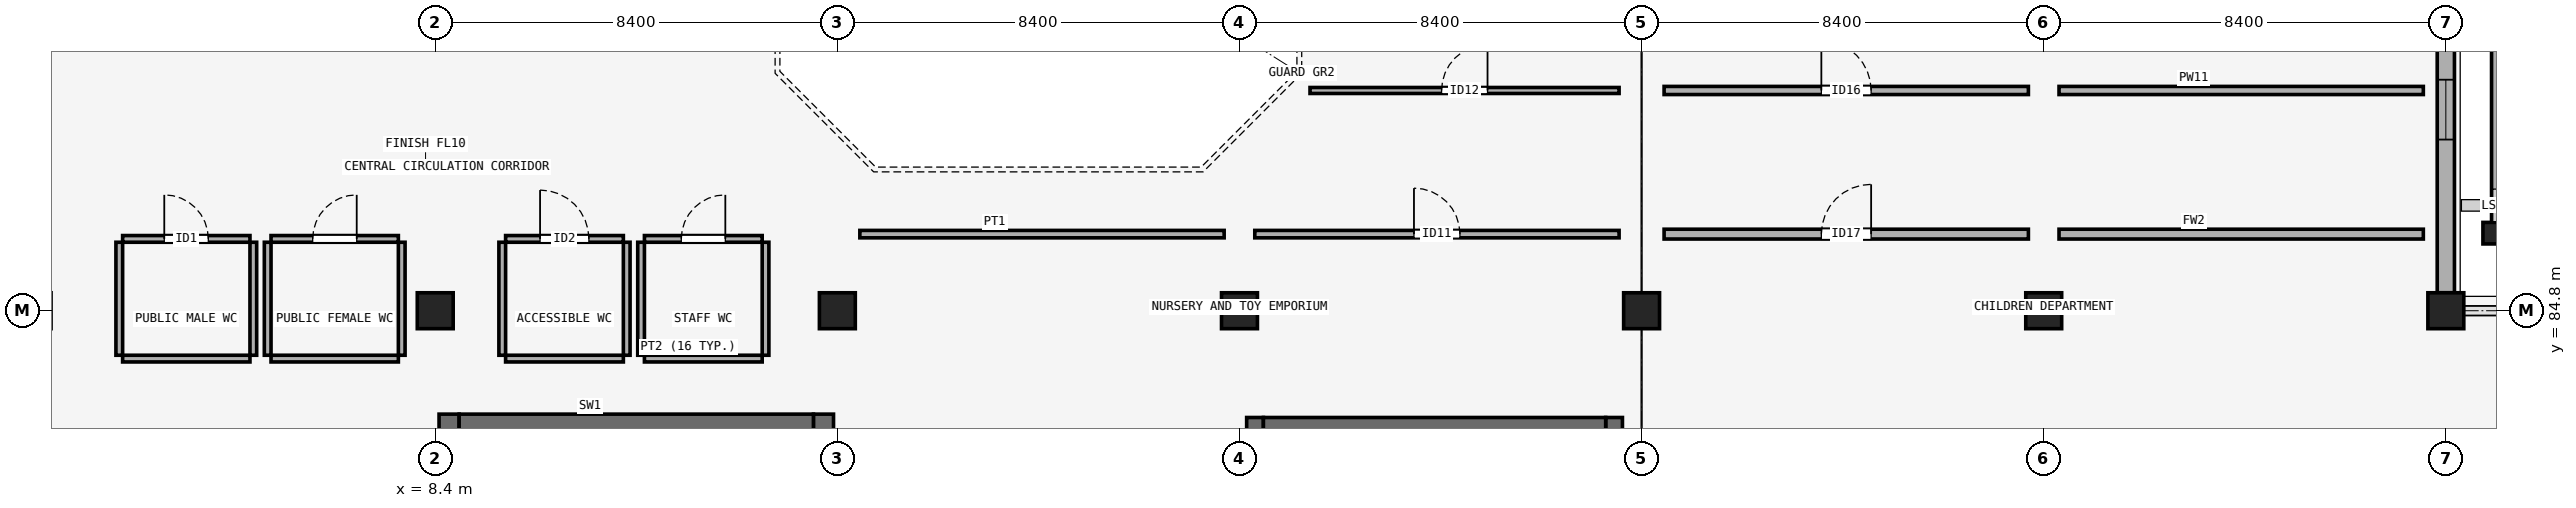
"""IFC4 building model, lengths in metres.
Left out: names, types, materials, properties, quantities, classifications, styles, units other than length and angle.
Written with IfcOpenShell. Run it as: python <this file> out.ifc"""

import sys

from ifc_helpers import new_model, si_unit, direction, frame, frame_2d, origin, origin_2d, place, context, subcontext, project, spatial, rectangle, extrude, element, fill, save


model = new_model("IFC4")
c1 = context("Model", 3, precision=1e-05, world=origin(), true_north=direction((0.0, 1.0)))
c2 = subcontext(c1, "Body", "Model", "MODEL_VIEW")
j1 = project(units=[si_unit("LENGTHUNIT", "METRE"), si_unit("PLANEANGLEUNIT", "RADIAN")], contexts=[c1])
p1 = place(None, origin())
s1 = spatial("IfcSite", under=j1, at=p1, CompositionType="ELEMENT")
p2 = place(p1, origin())
s2 = spatial("IfcBuilding", under=s1, at=p2, CompositionType="ELEMENT")
p3 = place(p2, frame((0.0, 0.0, 14.4)))
s3 = spatial("IfcBuildingStorey", under=s2, at=p3, CompositionType="ELEMENT", Elevation=14.4)
for number, where, z_axis, x_axis in (
    (1, (8.4, 84.8, 0.0), (0.0, 0.0, 1.0), (1.0, 0.0, 0.0)),
    (2, (16.8, 84.8, 0.0), (0.0, 0.0, 1.0), (1.0, 0.0, 0.0)),
    (3, (25.2, 84.8, 0.0), (0.0, 0.0, 1.0), (1.0, 0.0, 0.0)),
    (4, (33.6, 84.8, 0.0), (0.0, 0.0, 1.0), (1.0, 0.0, 0.0)),
    (5, (42.0, 84.8, 0.0), (0.0, 0.0, 1.0), (1.0, 0.0, 0.0)),
    (6, (50.4, 84.8, 0.0), (0.0, 0.0, 1.0), (1.0, 0.0, 0.0)),
):
    element("IfcColumn", number, at=place(p3, frame(where, z_axis=z_axis, x_axis=x_axis)), inside=s3, PredefinedType="COLUMN", context=c2, shape_type="SweptSolid", body=[
        extrude(rectangle(XDim=0.75, YDim=0.75, at=origin_2d()), origin(), (0.0, 0.0, 1.0), 4.5),
    ])
p4 = place(p3, frame((51.45, 86.42, 0.0), z_axis=(0.0, 0.0, 1.0), x_axis=(0.0, 1.0, 0.0)))
e7 = element("IfcColumn", 7, at=p4, inside=s3, PredefinedType="PILASTER", context=c2, shape_type="SweptSolid", body=[
    extrude(rectangle(XDim=0.45, YDim=0.55, at=origin_2d()), origin(), (0.0, 0.0, 1.0), 4.5),
])
p5 = place(p3, frame((50.4, 85.175, 0.0), z_axis=(0.0, 0.0, 1.0), x_axis=(0.0, 1.0, 0.0)))
e8 = element("IfcWall", 8, at=p5, inside=s3, PredefinedType="SOLIDWALL", context=c2, shape_type="SweptSolid", body=[
    extrude(rectangle(XDim=7.65, YDim=0.36, at=frame_2d((3.825, 0.0))), origin(), (0.0, 0.0, 1.0), 3.45),
])
p6 = place(p5, frame((3.2, 0.0, 0.95)))
e9 = element("IfcOpeningElement", 9, at=p6, cuts=e8, PredefinedType="OPENING", context=c2, shape_type="SweptSolid", body=[
    extrude(rectangle(XDim=1.25, YDim=1.85, at=frame_2d((0.625, 0.925))), frame((0.0, 0.19, 0.0), z_axis=(0.0, -1.0, 0.0), x_axis=(1.0, 0.0, 0.0)), (0.0, 0.0, 1.0), 0.38),
])
p7 = place(p3, frame((51.45, 86.67, 3.88), z_axis=(0.0, 0.0, 1.0), x_axis=(0.0, 1.0, 0.0)))
e10 = element("IfcWall", 10, at=p7, inside=s3, PredefinedType="PARAPET", context=c2, shape_type="SweptSolid", body=[
    extrude(rectangle(XDim=4.66, YDim=0.19, at=frame_2d((2.33, 0.0))), origin(), (0.0, 0.0, 1.0), 0.12),
])
p8 = place(p3, frame((8.69, 82.64, 0.0), z_axis=(0.0, 0.0, 1.0), x_axis=(0.0, -1.0, 0.0)))
e11 = element("IfcWall", 11, at=p8, inside=s3, PredefinedType="SHEAR", context=c2, shape_type="SweptSolid", body=[
    extrude(rectangle(XDim=4.08, YDim=0.42, at=frame_2d((2.04, 0.0))), origin(), (0.0, 0.0, 1.0), 4.2),
])
p9 = place(p8, frame((1.315, 0.0, 0.0)))
e12 = element("IfcOpeningElement", 12, at=p9, cuts=e11, PredefinedType="OPENING", context=c2, shape_type="SweptSolid", body=[
    extrude(rectangle(XDim=1.45, YDim=2.2, at=frame_2d((0.725, 1.1))), frame((0.0, 0.22, 0.0), z_axis=(0.0, -1.0, 0.0), x_axis=(1.0, 0.0, 0.0)), (0.0, 0.0, 1.0), 0.44),
])
p10 = place(p3, frame((16.51, 78.56, 0.0), z_axis=(0.0, 0.0, 1.0), x_axis=(0.0, 1.0, 0.0)))
e13 = element("IfcWall", 13, at=p10, inside=s3, PredefinedType="SHEAR", context=c2, shape_type="SweptSolid", body=[
    extrude(rectangle(XDim=4.08, YDim=0.42, at=frame_2d((2.04, 0.0))), origin(), (0.0, 0.0, 1.0), 4.2),
])
p11 = place(p3, frame((8.9, 82.43, 0.0), z_axis=(0.0, 0.0, 1.0), x_axis=(1.0, 0.0, 0.0)))
e14 = element("IfcWall", 14, at=p11, inside=s3, PredefinedType="SHEAR", context=c2, shape_type="SweptSolid", body=[
    extrude(rectangle(XDim=7.4, YDim=0.42, at=frame_2d((3.7, 0.0))), origin(), (0.0, 0.0, 1.0), 4.2),
])
p12 = place(p3, frame((25.525, 82.57, 0.0), z_axis=(0.0, 0.0, 1.0), x_axis=(0.0, -1.0, 0.0)))
e15 = element("IfcWall", 15, at=p12, inside=s3, PredefinedType="SHEAR", context=c2, shape_type="SweptSolid", body=[
    extrude(rectangle(XDim=3.94, YDim=0.35, at=frame_2d((1.97, 0.0))), origin(), (0.0, 0.0, 1.0), 4.2),
])
p13 = place(p12, frame((1.245, 0.0, 0.0)))
e16 = element("IfcOpeningElement", 16, at=p13, cuts=e15, PredefinedType="OPENING", context=c2, shape_type="SweptSolid", body=[
    extrude(rectangle(XDim=1.45, YDim=2.2, at=frame_2d((0.725, 1.1))), frame((0.0, 0.185, 0.0), z_axis=(0.0, -1.0, 0.0), x_axis=(1.0, 0.0, 0.0)), (0.0, 0.0, 1.0), 0.37),
])
p14 = place(p3, frame((33.025, 78.63, 0.0), z_axis=(0.0, 0.0, 1.0), x_axis=(0.0, 1.0, 0.0)))
e17 = element("IfcWall", 17, at=p14, inside=s3, PredefinedType="SHEAR", context=c2, shape_type="SweptSolid", body=[
    extrude(rectangle(XDim=3.94, YDim=0.35, at=frame_2d((1.97, 0.0))), origin(), (0.0, 0.0, 1.0), 4.2),
])
p15 = place(p3, frame((25.7, 82.395, 0.0), z_axis=(0.0, 0.0, 1.0), x_axis=(1.0, 0.0, 0.0)))
e18 = element("IfcWall", 18, at=p15, inside=s3, PredefinedType="SHEAR", context=c2, shape_type="SweptSolid", body=[
    extrude(rectangle(XDim=7.15, YDim=0.35, at=frame_2d((3.575, 0.0))), origin(), (0.0, 0.0, 1.0), 4.2),
])
p16 = place(p3, frame((1.87, 86.3, 0.0), z_axis=(0.0, 0.0, 1.0), x_axis=(1.0, 0.0, 0.0)))
e19 = element("IfcWall", 19, at=p16, inside=s3, PredefinedType="PARTITIONING", context=c2, shape_type="SweptSolid", body=[
    extrude(rectangle(XDim=2.66, YDim=0.14, at=frame_2d((1.33, 0.0))), origin(), (0.0, 0.0, 1.0), 4.2),
])
p17 = place(p16, frame((0.87, 0.0, 0.0)))
e20 = element("IfcOpeningElement", 20, at=p17, cuts=e19, PredefinedType="OPENING", context=c2, shape_type="SweptSolid", body=[
    extrude(rectangle(XDim=0.92, YDim=2.12, at=frame_2d((0.46, 1.06))), frame((0.0, 0.08, 0.0), z_axis=(0.0, -1.0, 0.0), x_axis=(1.0, 0.0, 0.0)), (0.0, 0.0, 1.0), 0.16),
])
p18 = place(p3, frame((1.87, 83.8, 0.0), z_axis=(0.0, 0.0, 1.0), x_axis=(1.0, 0.0, 0.0)))
e21 = element("IfcWall", 21, at=p18, inside=s3, PredefinedType="PARTITIONING", context=c2, shape_type="SweptSolid", body=[
    extrude(rectangle(XDim=2.66, YDim=0.14, at=frame_2d((1.33, 0.0))), origin(), (0.0, 0.0, 1.0), 4.2),
])
for number, where, z_axis, x_axis in (
    (22, (1.8, 83.87, 0.0), (0.0, 0.0, 1.0), (0.0, 1.0, 0.0)),
    (23, (4.6, 83.87, 0.0), (0.0, 0.0, 1.0), (0.0, 1.0, 0.0)),
):
    element("IfcWall", number, at=place(p3, frame(where, z_axis=z_axis, x_axis=x_axis)), inside=s3, PredefinedType="PARTITIONING", context=c2, shape_type="SweptSolid", body=[
        extrude(rectangle(XDim=2.36, YDim=0.14, at=frame_2d((1.18, 0.0))), origin(), (0.0, 0.0, 1.0), 3.45),
    ])
p19 = place(p3, frame((4.97, 86.3, 0.0), z_axis=(0.0, 0.0, 1.0), x_axis=(1.0, 0.0, 0.0)))
e24 = element("IfcWall", 24, at=p19, inside=s3, PredefinedType="PARTITIONING", context=c2, shape_type="SweptSolid", body=[
    extrude(rectangle(XDim=2.66, YDim=0.14, at=frame_2d((1.33, 0.0))), origin(), (0.0, 0.0, 1.0), 4.2),
])
p20 = place(p19, frame((0.87, 0.0, 0.0)))
e25 = element("IfcOpeningElement", 25, at=p20, cuts=e24, PredefinedType="OPENING", context=c2, shape_type="SweptSolid", body=[
    extrude(rectangle(XDim=0.92, YDim=2.12, at=frame_2d((0.46, 1.06))), frame((0.0, 0.08, 0.0), z_axis=(0.0, -1.0, 0.0), x_axis=(1.0, 0.0, 0.0)), (0.0, 0.0, 1.0), 0.16),
])
p21 = place(p3, frame((4.97, 83.8, 0.0), z_axis=(0.0, 0.0, 1.0), x_axis=(1.0, 0.0, 0.0)))
e26 = element("IfcWall", 26, at=p21, inside=s3, PredefinedType="PARTITIONING", context=c2, shape_type="SweptSolid", body=[
    extrude(rectangle(XDim=2.66, YDim=0.14, at=frame_2d((1.33, 0.0))), origin(), (0.0, 0.0, 1.0), 4.2),
])
for number, where, z_axis, x_axis in (
    (27, (4.9, 83.87, 0.0), (0.0, 0.0, 1.0), (0.0, 1.0, 0.0)),
    (28, (7.7, 83.87, 0.0), (0.0, 0.0, 1.0), (0.0, 1.0, 0.0)),
):
    element("IfcWall", number, at=place(p3, frame(where, z_axis=z_axis, x_axis=x_axis)), inside=s3, PredefinedType="PARTITIONING", context=c2, shape_type="SweptSolid", body=[
        extrude(rectangle(XDim=2.36, YDim=0.14, at=frame_2d((1.18, 0.0))), origin(), (0.0, 0.0, 1.0), 3.45),
    ])
p22 = place(p3, frame((9.87, 86.3, 0.0), z_axis=(0.0, 0.0, 1.0), x_axis=(1.0, 0.0, 0.0)))
e29 = element("IfcWall", 29, at=p22, inside=s3, PredefinedType="PARTITIONING", context=c2, shape_type="SweptSolid", body=[
    extrude(rectangle(XDim=2.46, YDim=0.14, at=frame_2d((1.23, 0.0))), origin(), (0.0, 0.0, 1.0), 4.2),
])
p23 = place(p22, frame((0.72, 0.0, 0.0)))
e30 = element("IfcOpeningElement", 30, at=p23, cuts=e29, PredefinedType="OPENING", context=c2, shape_type="SweptSolid", body=[
    extrude(rectangle(XDim=1.02, YDim=2.15, at=frame_2d((0.51, 1.075))), frame((0.0, 0.08, 0.0), z_axis=(0.0, -1.0, 0.0), x_axis=(1.0, 0.0, 0.0)), (0.0, 0.0, 1.0), 0.16),
])
p24 = place(p3, frame((9.87, 83.8, 0.0), z_axis=(0.0, 0.0, 1.0), x_axis=(1.0, 0.0, 0.0)))
e31 = element("IfcWall", 31, at=p24, inside=s3, PredefinedType="PARTITIONING", context=c2, shape_type="SweptSolid", body=[
    extrude(rectangle(XDim=2.46, YDim=0.14, at=frame_2d((1.23, 0.0))), origin(), (0.0, 0.0, 1.0), 4.2),
])
for number, where, z_axis, x_axis in (
    (32, (9.8, 83.87, 0.0), (0.0, 0.0, 1.0), (0.0, 1.0, 0.0)),
    (33, (12.4, 83.87, 0.0), (0.0, 0.0, 1.0), (0.0, 1.0, 0.0)),
):
    element("IfcWall", number, at=place(p3, frame(where, z_axis=z_axis, x_axis=x_axis)), inside=s3, PredefinedType="PARTITIONING", context=c2, shape_type="SweptSolid", body=[
        extrude(rectangle(XDim=2.36, YDim=0.14, at=frame_2d((1.18, 0.0))), origin(), (0.0, 0.0, 1.0), 3.45),
    ])
p25 = place(p3, frame((12.77, 86.3, 0.0), z_axis=(0.0, 0.0, 1.0), x_axis=(1.0, 0.0, 0.0)))
e34 = element("IfcWall", 34, at=p25, inside=s3, PredefinedType="PARTITIONING", context=c2, shape_type="SweptSolid", body=[
    extrude(rectangle(XDim=2.46, YDim=0.14, at=frame_2d((1.23, 0.0))), origin(), (0.0, 0.0, 1.0), 4.2),
])
p26 = place(p25, frame((0.77, 0.0, 0.0)))
e35 = element("IfcOpeningElement", 35, at=p26, cuts=e34, PredefinedType="OPENING", context=c2, shape_type="SweptSolid", body=[
    extrude(rectangle(XDim=0.92, YDim=2.12, at=frame_2d((0.46, 1.06))), frame((0.0, 0.08, 0.0), z_axis=(0.0, -1.0, 0.0), x_axis=(1.0, 0.0, 0.0)), (0.0, 0.0, 1.0), 0.16),
])
p27 = place(p3, frame((12.77, 83.8, 0.0), z_axis=(0.0, 0.0, 1.0), x_axis=(1.0, 0.0, 0.0)))
e36 = element("IfcWall", 36, at=p27, inside=s3, PredefinedType="PARTITIONING", context=c2, shape_type="SweptSolid", body=[
    extrude(rectangle(XDim=2.46, YDim=0.14, at=frame_2d((1.23, 0.0))), origin(), (0.0, 0.0, 1.0), 4.2),
])
for number, where, z_axis, x_axis in (
    (37, (12.7, 83.87, 0.0), (0.0, 0.0, 1.0), (0.0, 1.0, 0.0)),
    (38, (15.3, 83.87, 0.0), (0.0, 0.0, 1.0), (0.0, 1.0, 0.0)),
):
    element("IfcWall", number, at=place(p3, frame(where, z_axis=z_axis, x_axis=x_axis)), inside=s3, PredefinedType="PARTITIONING", context=c2, shape_type="SweptSolid", body=[
        extrude(rectangle(XDim=2.36, YDim=0.14, at=frame_2d((1.18, 0.0))), origin(), (0.0, 0.0, 1.0), 3.45),
    ])
p28 = place(p3, frame((17.27, 86.4, 0.0), z_axis=(0.0, 0.0, 1.0), x_axis=(1.0, 0.0, 0.0)))
e39 = element("IfcWall", 39, at=p28, inside=s3, PredefinedType="PARTITIONING", context=c2, shape_type="SweptSolid", body=[
    extrude(rectangle(XDim=7.61, YDim=0.155, at=frame_2d((3.805, 0.0))), origin(), (0.0, 0.0, 1.0), 4.2),
])
p29 = place(p3, frame((25.52, 86.4, 0.0), z_axis=(0.0, 0.0, 1.0), x_axis=(1.0, 0.0, 0.0)))
e40 = element("IfcWall", 40, at=p29, inside=s3, PredefinedType="PARTITIONING", context=c2, shape_type="SweptSolid", body=[
    extrude(rectangle(XDim=7.61, YDim=0.155, at=frame_2d((3.805, 0.0))), origin(), (0.0, 0.0, 1.0), 4.2),
])
p30 = place(p29, frame((3.325, 0.0, 0.0)))
e41 = element("IfcOpeningElement", 41, at=p30, cuts=e40, PredefinedType="OPENING", context=c2, shape_type="SweptSolid", body=[
    extrude(rectangle(XDim=0.96, YDim=2.1, at=frame_2d((0.48, 1.05))), frame((0.0, 0.087, 0.0), z_axis=(0.0, -1.0, 0.0), x_axis=(1.0, 0.0, 0.0)), (0.0, 0.0, 1.0), 0.175),
])
p31 = place(p3, frame((26.674, 89.4, 0.0), z_axis=(0.0, 0.0, 1.0), x_axis=(1.0, 0.0, 0.0)))
e42 = element("IfcWall", 42, at=p31, inside=s3, PredefinedType="PARTITIONING", context=c2, shape_type="SweptSolid", body=[
    extrude(rectangle(XDim=6.456, YDim=0.125, at=frame_2d((3.228, 0.0))), origin(), (0.0, 0.0, 1.0), 4.2),
])
p32 = place(p31, frame((2.748, 0.0, 0.0)))
e43 = element("IfcOpeningElement", 43, at=p32, cuts=e42, PredefinedType="OPENING", context=c2, shape_type="SweptSolid", body=[
    extrude(rectangle(XDim=0.96, YDim=2.22, at=frame_2d((0.48, 1.11))), frame((0.0, 0.073, 0.0), z_axis=(0.0, -1.0, 0.0), x_axis=(1.0, 0.0, 0.0)), (0.0, 0.0, 1.0), 0.145),
])
p33 = place(p3, frame((34.07, 89.4, 0.0), z_axis=(0.0, 0.0, 1.0), x_axis=(1.0, 0.0, 0.0)))
e44 = element("IfcWall", 44, at=p33, inside=s3, PredefinedType="PARTITIONING", context=c2, shape_type="SweptSolid", body=[
    extrude(rectangle(XDim=7.61, YDim=0.17, at=frame_2d((3.805, 0.0))), origin(), (0.0, 0.0, 1.0), 3.45),
])
p34 = place(p33, frame((3.285, 0.0, 0.0)))
e45 = element("IfcOpeningElement", 45, at=p34, cuts=e44, PredefinedType="OPENING", context=c2, shape_type="SweptSolid", body=[
    extrude(rectangle(XDim=1.04, YDim=2.22, at=frame_2d((0.52, 1.11))), frame((0.0, 0.095, 0.0), z_axis=(0.0, -1.0, 0.0), x_axis=(1.0, 0.0, 0.0)), (0.0, 0.0, 1.0), 0.19),
])
p35 = place(p3, frame((42.32, 89.4, 0.0), z_axis=(0.0, 0.0, 1.0), x_axis=(1.0, 0.0, 0.0)))
e46 = element("IfcWall", 46, at=p35, inside=s3, PredefinedType="PARTITIONING", context=c2, shape_type="SweptSolid", body=[
    extrude(rectangle(XDim=7.61, YDim=0.17, at=frame_2d((3.805, 0.0))), origin(), (0.0, 0.0, 1.0), 3.45),
])
p36 = place(p3, frame((34.07, 86.4, 0.0), z_axis=(0.0, 0.0, 1.0), x_axis=(1.0, 0.0, 0.0)))
e47 = element("IfcWall", 47, at=p36, inside=s3, PredefinedType="PARTITIONING", context=c2, shape_type="SweptSolid", body=[
    extrude(rectangle(XDim=7.61, YDim=0.205, at=frame_2d((3.805, 0.0))), origin(), (0.0, 0.0, 1.0), 3.45),
])
p37 = place(p36, frame((3.285, 0.0, 0.0)))
e48 = element("IfcOpeningElement", 48, at=p37, cuts=e47, PredefinedType="OPENING", context=c2, shape_type="SweptSolid", body=[
    extrude(rectangle(XDim=1.04, YDim=2.34, at=frame_2d((0.52, 1.17))), frame((0.0, 0.113, 0.0), z_axis=(0.0, -1.0, 0.0), x_axis=(1.0, 0.0, 0.0)), (0.0, 0.0, 1.0), 0.225),
])
p38 = place(p3, frame((42.32, 86.4, 0.0), z_axis=(0.0, 0.0, 1.0), x_axis=(1.0, 0.0, 0.0)))
e49 = element("IfcWall", 49, at=p38, inside=s3, PredefinedType="PARTITIONING", context=c2, shape_type="SweptSolid", body=[
    extrude(rectangle(XDim=7.61, YDim=0.205, at=frame_2d((3.805, 0.0))), origin(), (0.0, 0.0, 1.0), 3.45),
])
p39 = place(p6, origin())
e50 = element("IfcWindow", 50, at=p39, inside=s3, PartitioningType="SINGLE_PANEL", PredefinedType="WINDOW", context=c2, shape_type="SweptSolid", body=[
    extrude(rectangle(XDim=1.25, YDim=1.85, at=frame_2d((0.625, 0.925))), frame((0.0, 0.03, 0.0), z_axis=(0.0, -1.0, 0.0), x_axis=(1.0, 0.0, 0.0)), (0.0, 0.0, 1.0), 0.06),
])
fill(e9, e50)
p40 = place(p17, origin())
e51 = element("IfcDoor", 51, at=p40, inside=s3, OperationType="SINGLE_SWING_LEFT", PredefinedType="DOOR", context=c2, shape_type="SweptSolid", body=[
    extrude(rectangle(XDim=0.92, YDim=2.12, at=frame_2d((0.46, 1.06))), frame((0.0, 0.025, 0.0), z_axis=(0.0, -1.0, 0.0), x_axis=(1.0, 0.0, 0.0)), (0.0, 0.0, 1.0), 0.05),
])
fill(e20, e51)
p41 = place(p20, origin())
e52 = element("IfcDoor", 52, at=p41, inside=s3, OperationType="SINGLE_SWING_RIGHT", PredefinedType="DOOR", context=c2, shape_type="SweptSolid", body=[
    extrude(rectangle(XDim=0.92, YDim=2.12, at=frame_2d((0.46, 1.06))), frame((0.0, 0.025, 0.0), z_axis=(0.0, -1.0, 0.0), x_axis=(1.0, 0.0, 0.0)), (0.0, 0.0, 1.0), 0.05),
])
fill(e25, e52)
p42 = place(p23, origin())
e53 = element("IfcDoor", 53, at=p42, inside=s3, OperationType="SINGLE_SWING_LEFT", PredefinedType="DOOR", context=c2, shape_type="SweptSolid", body=[
    extrude(rectangle(XDim=1.02, YDim=2.15, at=frame_2d((0.51, 1.075))), frame((0.0, 0.025, 0.0), z_axis=(0.0, -1.0, 0.0), x_axis=(1.0, 0.0, 0.0)), (0.0, 0.0, 1.0), 0.05),
])
fill(e30, e53)
p43 = place(p26, origin())
e54 = element("IfcDoor", 54, at=p43, inside=s3, OperationType="SINGLE_SWING_RIGHT", PredefinedType="DOOR", context=c2, shape_type="SweptSolid", body=[
    extrude(rectangle(XDim=0.92, YDim=2.12, at=frame_2d((0.46, 1.06))), frame((0.0, 0.025, 0.0), z_axis=(0.0, -1.0, 0.0), x_axis=(1.0, 0.0, 0.0)), (0.0, 0.0, 1.0), 0.05),
])
fill(e35, e54)
p44 = place(p30, origin())
e55 = element("IfcDoor", 55, at=p44, inside=s3, OperationType="SINGLE_SWING_LEFT", PredefinedType="DOOR", context=c2, shape_type="SweptSolid", body=[
    extrude(rectangle(XDim=0.96, YDim=2.1, at=frame_2d((0.48, 1.05))), frame((0.0, 0.025, 0.0), z_axis=(0.0, -1.0, 0.0), x_axis=(1.0, 0.0, 0.0)), (0.0, 0.0, 1.0), 0.05),
])
fill(e41, e55)
p45 = place(p32, origin())
e56 = element("IfcDoor", 56, at=p45, inside=s3, OperationType="SINGLE_SWING_RIGHT", PredefinedType="DOOR", context=c2, shape_type="SweptSolid", body=[
    extrude(rectangle(XDim=0.96, YDim=2.22, at=frame_2d((0.48, 1.11))), frame((0.0, 0.025, 0.0), z_axis=(0.0, -1.0, 0.0), x_axis=(1.0, 0.0, 0.0)), (0.0, 0.0, 1.0), 0.05),
])
fill(e43, e56)
p46 = place(p34, origin())
e57 = element("IfcDoor", 57, at=p46, inside=s3, OperationType="SINGLE_SWING_LEFT", PredefinedType="DOOR", context=c2, shape_type="SweptSolid", body=[
    extrude(rectangle(XDim=1.04, YDim=2.22, at=frame_2d((0.52, 1.11))), frame((0.0, 0.025, 0.0), z_axis=(0.0, -1.0, 0.0), x_axis=(1.0, 0.0, 0.0)), (0.0, 0.0, 1.0), 0.05),
])
fill(e45, e57)
p47 = place(p37, origin())
e58 = element("IfcDoor", 58, at=p47, inside=s3, OperationType="SINGLE_SWING_RIGHT", PredefinedType="DOOR", context=c2, shape_type="SweptSolid", body=[
    extrude(rectangle(XDim=1.04, YDim=2.34, at=frame_2d((0.52, 1.17))), frame((0.0, 0.025, 0.0), z_axis=(0.0, -1.0, 0.0), x_axis=(1.0, 0.0, 0.0)), (0.0, 0.0, 1.0), 0.05),
])
fill(e48, e58)
save(model, sys.argv[1])
